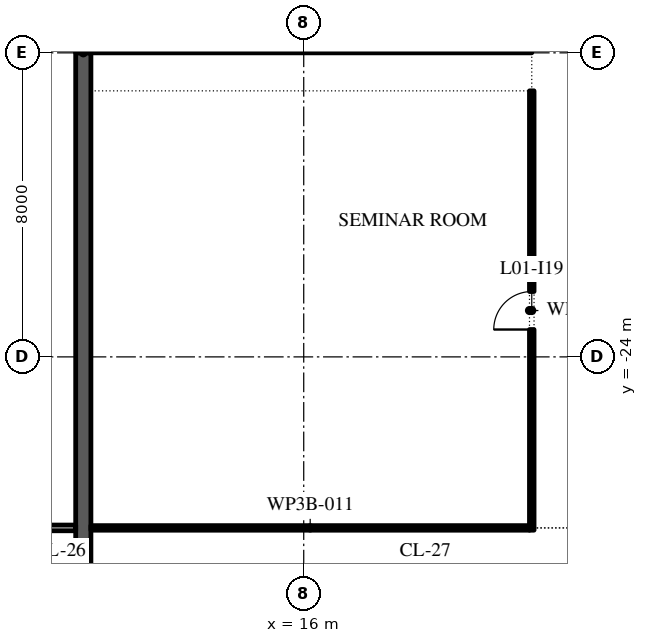
"""IFC4 building model, lengths in metres.
Left out: names, types, materials, properties, quantities, classifications, styles, units other than length and angle.
Written with IfcOpenShell. Run it as: python <this file> out.ifc"""

import sys

from ifc_helpers import new_model, si_unit, direction, frame, frame_2d, origin, place, context, subcontext, project, spatial, rectangle, extrude, element, fill, save


model = new_model("IFC4")
c1 = context("Model", 3, precision=1e-05, world=origin(), true_north=direction((0.0, 1.0)))
c2 = subcontext(c1, "Body", "Model", "MODEL_VIEW")
j1 = project(units=[si_unit("LENGTHUNIT", "METRE"), si_unit("PLANEANGLEUNIT", "RADIAN")], contexts=[c1])
p1 = place(None, origin())
s1 = spatial("IfcSite", under=j1, at=p1, CompositionType="ELEMENT")
p2 = place(p1, origin())
s2 = spatial("IfcBuilding", under=s1, at=p2, CompositionType="ELEMENT")
p3 = place(p2, frame((0.0, 0.0, 8.0)))
s3 = spatial("IfcBuildingStorey", under=s2, at=p3, CompositionType="ELEMENT", Elevation=8.0)
p4 = place(p3, frame((10.2, -31.0, 0.0), z_axis=(0.0, 0.0, 1.0), x_axis=(0.0, 1.0, 0.0)))
e1 = element("IfcWall", 1, at=p4, inside=s3, PredefinedType="SHEAR", context=c2, shape_type="SweptSolid", body=[
    extrude(rectangle(XDim=15.0, YDim=0.4, at=frame_2d((7.5, 0.0))), origin(), (0.0, 0.0, 1.0), 5.7),
])
p5 = place(p3, frame((2.075, -28.5, 0.0), z_axis=(0.0, 0.0, 1.0), x_axis=(1.0, 0.0, 0.0)))
e2 = element("IfcWall", 2, at=p5, inside=s3, PredefinedType="PARTITIONING", context=c2, shape_type="SweptSolid", body=[
    extrude(rectangle(XDim=7.925, YDim=0.15, at=frame_2d((3.962, 0.0))), origin(), (0.0, 0.0, 1.0), 5.7),
])
p6 = place(p3, frame((10.4, -28.5, 0.0), z_axis=(0.0, 0.0, 1.0), x_axis=(1.0, 0.0, 0.0)))
e3 = element("IfcWall", 3, at=p6, inside=s3, PredefinedType="PARTITIONING", context=c2, shape_type="SweptSolid", body=[
    extrude(rectangle(XDim=11.54, YDim=0.12, at=frame_2d((5.77, 0.0))), origin(), (0.0, 0.0, 1.0), 5.7),
])
p7 = place(p3, frame((22.0, -28.56, 0.0), z_axis=(0.0, 0.0, 1.0), x_axis=(0.0, 1.0, 0.0)))
e4 = element("IfcWall", 4, at=p7, inside=s3, PredefinedType="PARTITIONING", context=c2, shape_type="SweptSolid", body=[
    extrude(rectangle(XDim=11.56, YDim=0.12, at=frame_2d((5.78, 0.0))), origin(), (0.0, 0.0, 1.0), 5.7),
])
p8 = place(p7, frame((5.28, 0.0, 0.0)))
e5 = element("IfcOpeningElement", 5, at=p8, cuts=e4, PredefinedType="OPENING", context=c2, shape_type="SweptSolid", body=[
    extrude(rectangle(XDim=1.0, YDim=2.1, at=frame_2d((0.5, 1.05))), frame((0.0, 0.07, 0.0), z_axis=(0.0, -1.0, 0.0), x_axis=(1.0, 0.0, 0.0)), (0.0, 0.0, 1.0), 0.14),
])
p9 = place(p8, origin())
e6 = element("IfcDoor", 6, at=p9, inside=s3, OperationType="SINGLE_SWING_RIGHT", PredefinedType="DOOR", context=c2, shape_type="SweptSolid", body=[
    extrude(rectangle(XDim=1.0, YDim=2.1, at=frame_2d((0.5, 1.05))), frame((0.0, 0.025, 0.0), z_axis=(0.0, -1.0, 0.0), x_axis=(1.0, 0.0, 0.0)), (0.0, 0.0, 1.0), 0.05),
])
fill(e5, e6)
save(model, sys.argv[1])
